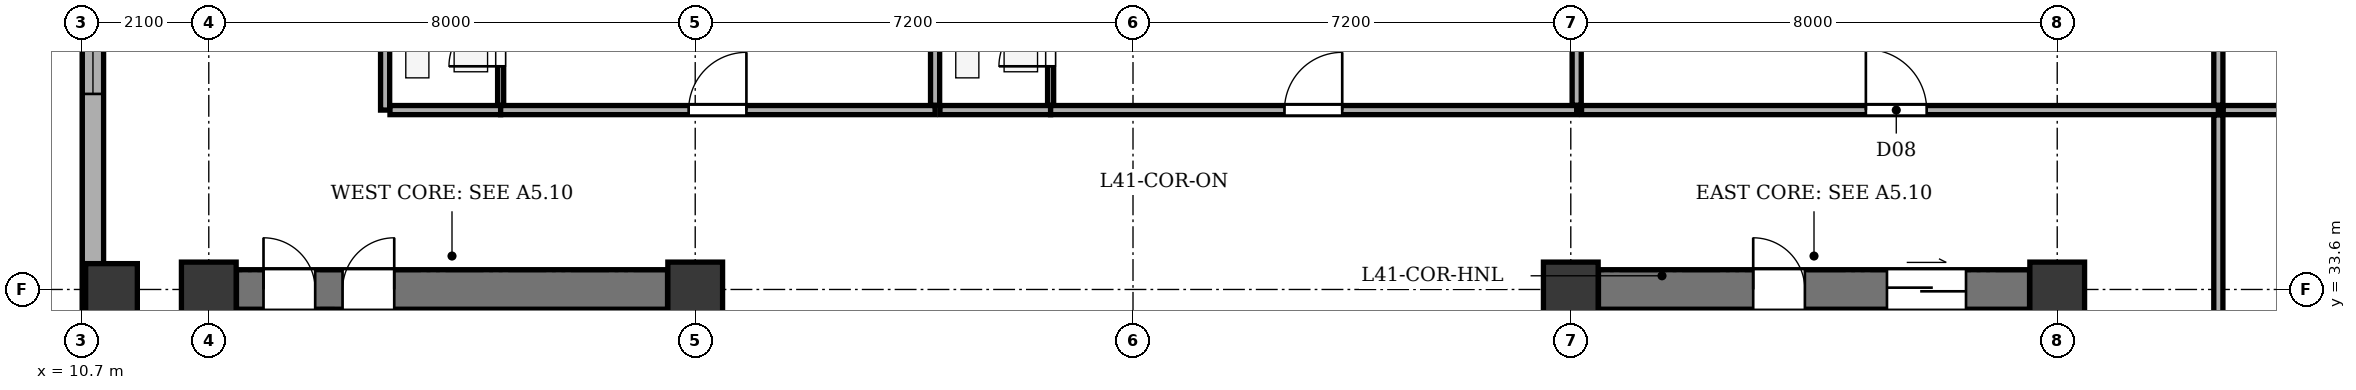
"""IFC4 building model, lengths in metres.
Left out: names, types, materials, properties, quantities, classifications, styles, units other than length and angle.
Written with IfcOpenShell. Run it as: python <this file> out.ifc"""

import sys

from ifc_helpers import new_model, si_unit, direction, frame, frame_2d, origin, origin_2d, place, context, subcontext, project, spatial, rectangle, extrude, element, fill, save


model = new_model("IFC4")
c1 = context("Model", 3, precision=1e-05, world=origin(), true_north=direction((0.0, 1.0)))
c2 = subcontext(c1, "Body", "Model", "MODEL_VIEW")
j1 = project(units=[si_unit("LENGTHUNIT", "METRE"), si_unit("PLANEANGLEUNIT", "RADIAN")], contexts=[c1])
p1 = place(None, origin())
s1 = spatial("IfcSite", under=j1, at=p1, CompositionType="ELEMENT")
p2 = place(p1, origin())
s2 = spatial("IfcBuilding", under=s1, at=p2, CompositionType="ELEMENT")
p3 = place(p2, frame((0.0, 0.0, 162.3)))
s3 = spatial("IfcBuildingStorey", under=s2, at=p3, CompositionType="ELEMENT", Elevation=162.3)
for number, where, z_axis, x_axis in (
    (1, (12.8, 33.6, 0.0), (0.0, 0.0, 1.0), (1.0, 0.0, 0.0)),
    (2, (20.8, 33.6, 0.0), (0.0, 0.0, 1.0), (1.0, 0.0, 0.0)),
    (3, (35.2, 33.6, 0.0), (0.0, 0.0, 1.0), (1.0, 0.0, 0.0)),
    (4, (43.2, 33.6, 0.0), (0.0, 0.0, 1.0), (1.0, 0.0, 0.0)),
):
    element("IfcColumn", number, at=place(p3, frame(where, z_axis=z_axis, x_axis=x_axis)), inside=s3, PredefinedType="COLUMN", context=c2, shape_type="SweptSolid", body=[
        extrude(rectangle(XDim=0.9, YDim=0.9, at=origin_2d()), origin(), (0.0, 0.0, 1.0), 3.5),
    ])
p4 = place(p3, frame((11.2, 33.6, 0.0), z_axis=(0.0, 0.0, 1.0), x_axis=(1.0, 0.0, 0.0)))
e5 = element("IfcColumn", 5, at=p4, inside=s3, PredefinedType="COLUMN", context=c2, shape_type="SweptSolid", body=[
    extrude(rectangle(XDim=0.85, YDim=0.85, at=origin_2d()), origin(), (0.0, 0.0, 1.0), 3.5),
])
p5 = place(p3, frame((10.895, 12.9, 0.0), z_axis=(0.0, 0.0, 1.0), x_axis=(0.0, 1.0, 0.0)))
e6 = element("IfcWall", 6, at=p5, inside=s3, PredefinedType="STANDARD", context=c2, shape_type="SweptSolid", body=[
    extrude(rectangle(XDim=35.0, YDim=0.35, at=frame_2d((17.5, 0.0))), origin(), (0.0, 0.0, 1.0), 2.785),
])
p6 = place(p5, frame((1.652, 0.0, 0.75)))
e7 = element("IfcOpeningElement", 7, at=p6, cuts=e6, PredefinedType="OPENING", context=c2, shape_type="SweptSolid", body=[
    extrude(rectangle(XDim=1.6, YDim=1.75, at=frame_2d((0.8, 0.875))), frame((0.0, 0.185, 0.0), z_axis=(0.0, -1.0, 0.0), x_axis=(1.0, 0.0, 0.0)), (0.0, 0.0, 1.0), 0.37),
])
p7 = place(p5, frame((4.748, 0.0, 0.75)))
e8 = element("IfcOpeningElement", 8, at=p7, cuts=e6, PredefinedType="OPENING", context=c2, shape_type="SweptSolid", body=[
    extrude(rectangle(XDim=1.6, YDim=1.75, at=frame_2d((0.8, 0.875))), frame((0.0, 0.185, 0.0), z_axis=(0.0, -1.0, 0.0), x_axis=(1.0, 0.0, 0.0)), (0.0, 0.0, 1.0), 0.37),
])
p8 = place(p5, frame((10.752, 0.0, 0.75)))
e9 = element("IfcOpeningElement", 9, at=p8, cuts=e6, PredefinedType="OPENING", context=c2, shape_type="SweptSolid", body=[
    extrude(rectangle(XDim=1.6, YDim=1.75, at=frame_2d((0.8, 0.875))), frame((0.0, 0.185, 0.0), z_axis=(0.0, -1.0, 0.0), x_axis=(1.0, 0.0, 0.0)), (0.0, 0.0, 1.0), 0.37),
])
p9 = place(p5, frame((15.998, 0.0, 0.75)))
e10 = element("IfcOpeningElement", 10, at=p9, cuts=e6, PredefinedType="OPENING", context=c2, shape_type="SweptSolid", body=[
    extrude(rectangle(XDim=2.1, YDim=1.75, at=frame_2d((1.05, 0.875))), frame((0.0, 0.185, 0.0), z_axis=(0.0, -1.0, 0.0), x_axis=(1.0, 0.0, 0.0)), (0.0, 0.0, 1.0), 0.37),
])
p10 = place(p5, frame((23.916, 0.0, 0.75)))
e11 = element("IfcOpeningElement", 11, at=p10, cuts=e6, PredefinedType="OPENING", context=c2, shape_type="SweptSolid", body=[
    extrude(rectangle(XDim=1.6, YDim=1.75, at=frame_2d((0.8, 0.875))), frame((0.0, 0.185, 0.0), z_axis=(0.0, -1.0, 0.0), x_axis=(1.0, 0.0, 0.0)), (0.0, 0.0, 1.0), 0.37),
])
p11 = place(p5, frame((29.834, 0.0, 0.75)))
e12 = element("IfcOpeningElement", 12, at=p11, cuts=e6, PredefinedType="OPENING", context=c2, shape_type="SweptSolid", body=[
    extrude(rectangle(XDim=2.1, YDim=1.75, at=frame_2d((1.05, 0.875))), frame((0.0, 0.185, 0.0), z_axis=(0.0, -1.0, 0.0), x_axis=(1.0, 0.0, 0.0)), (0.0, 0.0, 1.0), 0.37),
])
p12 = place(p3, frame((13.255, 33.6, 0.0), z_axis=(0.0, 0.0, 1.0), x_axis=(1.0, 0.0, 0.0)))
e13 = element("IfcWall", 13, at=p12, inside=s3, PredefinedType="SHEAR", context=c2, shape_type="SweptSolid", body=[
    extrude(rectangle(XDim=7.09, YDim=0.65, at=frame_2d((3.545, 0.0))), origin(), (0.0, 0.0, 1.0), 3.2),
])
p13 = place(p12, frame((0.445, 0.0, 0.0)))
e14 = element("IfcOpeningElement", 14, at=p13, cuts=e13, PredefinedType="OPENING", context=c2, shape_type="SweptSolid", body=[
    extrude(rectangle(XDim=0.85, YDim=2.02, at=frame_2d((0.425, 1.01))), frame((0.0, 0.335, 0.0), z_axis=(0.0, -1.0, 0.0), x_axis=(1.0, 0.0, 0.0)), (0.0, 0.0, 1.0), 0.67),
])
p14 = place(p12, frame((1.745, 0.0, 0.0)))
e15 = element("IfcOpeningElement", 15, at=p14, cuts=e13, PredefinedType="OPENING", context=c2, shape_type="SweptSolid", body=[
    extrude(rectangle(XDim=0.85, YDim=2.02, at=frame_2d((0.425, 1.01))), frame((0.0, 0.335, 0.0), z_axis=(0.0, -1.0, 0.0), x_axis=(1.0, 0.0, 0.0)), (0.0, 0.0, 1.0), 0.67),
])
p15 = place(p3, frame((16.435, 21.135, 0.0), z_axis=(0.0, 0.0, 1.0), x_axis=(0.0, 1.0, 0.0)))
e16 = element("IfcWall", 16, at=p15, inside=s3, PredefinedType="SHEAR", context=c2, shape_type="SweptSolid", body=[
    extrude(rectangle(XDim=12.13, YDim=0.25, at=frame_2d((6.065, 0.0))), origin(), (0.0, 0.0, 1.0), 3.2),
])
p16 = place(p15, frame((0.515, 0.0, 0.0)))
e17 = element("IfcOpeningElement", 17, at=p16, cuts=e16, PredefinedType="OPENING", context=c2, shape_type="SweptSolid", body=[
    extrude(rectangle(XDim=1.2, YDim=2.15, at=frame_2d((0.6, 1.075))), frame((0.0, 0.135, 0.0), z_axis=(0.0, -1.0, 0.0), x_axis=(1.0, 0.0, 0.0)), (0.0, 0.0, 1.0), 0.27),
])
p17 = place(p15, frame((2.665, 0.0, 0.0)))
e18 = element("IfcOpeningElement", 18, at=p17, cuts=e16, PredefinedType="OPENING", context=c2, shape_type="SweptSolid", body=[
    extrude(rectangle(XDim=1.15, YDim=2.15, at=frame_2d((0.575, 1.075))), frame((0.0, 0.135, 0.0), z_axis=(0.0, -1.0, 0.0), x_axis=(1.0, 0.0, 0.0)), (0.0, 0.0, 1.0), 0.27),
])
p18 = place(p3, frame((18.12, 31.17, 0.0), z_axis=(0.0, 0.0, 1.0), x_axis=(0.0, 1.0, 0.0)))
e19 = element("IfcWall", 19, at=p18, inside=s3, PredefinedType="PARTITIONING", context=c2, shape_type="SweptSolid", body=[
    extrude(rectangle(XDim=2.095, YDim=0.18, at=frame_2d((1.047, 0.0))), origin(), (0.0, 0.0, 1.0), 3.2),
])
p19 = place(p3, frame((35.655, 33.6, 0.0), z_axis=(0.0, 0.0, 1.0), x_axis=(1.0, 0.0, 0.0)))
e20 = element("IfcWall", 20, at=p19, inside=s3, PredefinedType="SHEAR", context=c2, shape_type="SweptSolid", body=[
    extrude(rectangle(XDim=7.09, YDim=0.65, at=frame_2d((3.545, 0.0))), origin(), (0.0, 0.0, 1.0), 3.2),
])
p20 = place(p19, frame((4.745, 0.0, 0.0)))
e21 = element("IfcOpeningElement", 21, at=p20, cuts=e20, PredefinedType="OPENING", context=c2, shape_type="SweptSolid", body=[
    extrude(rectangle(XDim=1.3, YDim=2.15, at=frame_2d((0.65, 1.075))), frame((0.0, 0.335, 0.0), z_axis=(0.0, -1.0, 0.0), x_axis=(1.0, 0.0, 0.0)), (0.0, 0.0, 1.0), 0.67),
])
p21 = place(p19, frame((2.545, 0.0, 0.0)))
e22 = element("IfcOpeningElement", 22, at=p21, cuts=e20, PredefinedType="OPENING", context=c2, shape_type="SweptSolid", body=[
    extrude(rectangle(XDim=0.85, YDim=2.02, at=frame_2d((0.425, 1.01))), frame((0.0, 0.335, 0.0), z_axis=(0.0, -1.0, 0.0), x_axis=(1.0, 0.0, 0.0)), (0.0, 0.0, 1.0), 0.67),
])
p22 = place(p3, frame((39.565, 21.135, 0.0), z_axis=(0.0, 0.0, 1.0), x_axis=(0.0, 1.0, 0.0)))
e23 = element("IfcWall", 23, at=p22, inside=s3, PredefinedType="SHEAR", context=c2, shape_type="SweptSolid", body=[
    extrude(rectangle(XDim=12.13, YDim=0.25, at=frame_2d((6.065, 0.0))), origin(), (0.0, 0.0, 1.0), 3.2),
])
p23 = place(p22, frame((0.515, 0.0, 0.0)))
e24 = element("IfcOpeningElement", 24, at=p23, cuts=e23, PredefinedType="OPENING", context=c2, shape_type="SweptSolid", body=[
    extrude(rectangle(XDim=1.2, YDim=2.15, at=frame_2d((0.6, 1.075))), frame((0.0, 0.135, 0.0), z_axis=(0.0, -1.0, 0.0), x_axis=(1.0, 0.0, 0.0)), (0.0, 0.0, 1.0), 0.27),
])
p24 = place(p22, frame((2.665, 0.0, 0.0)))
e25 = element("IfcOpeningElement", 25, at=p24, cuts=e23, PredefinedType="OPENING", context=c2, shape_type="SweptSolid", body=[
    extrude(rectangle(XDim=1.15, YDim=2.15, at=frame_2d((0.575, 1.075))), frame((0.0, 0.135, 0.0), z_axis=(0.0, -1.0, 0.0), x_axis=(1.0, 0.0, 0.0)), (0.0, 0.0, 1.0), 0.27),
])
p25 = place(p3, frame((37.9, 25.27, 0.0), z_axis=(0.0, 0.0, 1.0), x_axis=(0.0, 1.0, 0.0)))
e26 = element("IfcWall", 26, at=p25, inside=s3, PredefinedType="SOLIDWALL", context=c2, shape_type="SweptSolid", body=[
    extrude(rectangle(XDim=7.995, YDim=0.2, at=frame_2d((3.998, 0.0))), origin(), (0.0, 0.0, 1.0), 3.2),
])
p26 = place(p3, frame((14.75, 30.96, 0.0), z_axis=(0.0, 0.0, 1.0), x_axis=(0.0, 1.0, 0.0)))
e27 = element("IfcWall", 27, at=p26, inside=s3, PredefinedType="PARTITIONING", context=c2, shape_type="SweptSolid", body=[
    extrude(rectangle(XDim=2.31, YDim=0.15, at=frame_2d((1.155, 0.0))), origin(), (0.0, 0.0, 1.0), 3.2),
])
p27 = place(p26, frame((0.47, 0.0, 0.0)))
e28 = element("IfcOpeningElement", 28, at=p27, cuts=e27, PredefinedType="OPENING", context=c2, shape_type="SweptSolid", body=[
    extrude(rectangle(XDim=0.85, YDim=2.02, at=frame_2d((0.425, 1.01))), frame((0.0, 0.085, 0.0), z_axis=(0.0, -1.0, 0.0), x_axis=(1.0, 0.0, 0.0)), (0.0, 0.0, 1.0), 0.17),
])
p28 = place(p3, frame((15.7, 36.55, 0.0), z_axis=(0.0, 0.0, 1.0), x_axis=(0.0, 1.0, 0.0)))
e29 = element("IfcWall", 29, at=p28, inside=s3, PredefinedType="PARTITIONING", context=c2, shape_type="SweptSolid", body=[
    extrude(rectangle(XDim=15.975, YDim=0.15, at=frame_2d((7.987, 0.0))), origin(), (0.0, 0.0, 1.0), 3.2),
])
p29 = place(p3, frame((15.78, 36.55, 0.0), z_axis=(0.0, 0.0, 1.0), x_axis=(1.0, 0.0, 0.0)))
e30 = element("IfcWall", 30, at=p29, inside=s3, PredefinedType="PARTITIONING", context=c2, shape_type="SweptSolid", body=[
    extrude(rectangle(XDim=1.82, YDim=0.15, at=frame_2d((0.91, 0.0))), origin(), (0.0, 0.0, 1.0), 3.2),
])
p30 = place(p3, frame((17.6, 36.55, 0.0), z_axis=(0.0, 0.0, 1.0), x_axis=(1.0, 0.0, 0.0)))
e31 = element("IfcWall", 31, at=p30, inside=s3, PredefinedType="PARTITIONING", context=c2, shape_type="SweptSolid", body=[
    extrude(rectangle(XDim=7.145, YDim=0.15, at=frame_2d((3.573, 0.0))), origin(), (0.0, 0.0, 1.0), 3.2),
])
p31 = place(p30, frame((3.092, 0.0, 0.0)))
e32 = element("IfcOpeningElement", 32, at=p31, cuts=e31, PredefinedType="OPENING", context=c2, shape_type="SweptSolid", body=[
    extrude(rectangle(XDim=0.95, YDim=2.1, at=frame_2d((0.475, 1.05))), frame((0.0, 0.085, 0.0), z_axis=(0.0, -1.0, 0.0), x_axis=(1.0, 0.0, 0.0)), (0.0, 0.0, 1.0), 0.17),
])
p32 = place(p3, frame((17.6, 36.63, 0.0), z_axis=(0.0, 0.0, 1.0), x_axis=(0.0, 1.0, 0.0)))
e33 = element("IfcWall", 33, at=p32, inside=s3, PredefinedType="PARTITIONING", context=c2, shape_type="SweptSolid", body=[
    extrude(rectangle(XDim=2.25, YDim=0.1, at=frame_2d((1.125, 0.0))), origin(), (0.0, 0.0, 1.0), 3.2),
])
p33 = place(p32, frame((0.64, 0.0, 0.0)))
e34 = element("IfcOpeningElement", 34, at=p33, cuts=e33, PredefinedType="OPENING", context=c2, shape_type="SweptSolid", body=[
    extrude(rectangle(XDim=0.85, YDim=2.05, at=frame_2d((0.425, 1.025))), frame((0.0, 0.06, 0.0), z_axis=(0.0, -1.0, 0.0), x_axis=(1.0, 0.0, 0.0)), (0.0, 0.0, 1.0), 0.12),
])
p34 = place(p3, frame((24.745, 36.63, 0.0), z_axis=(0.0, 0.0, 1.0), x_axis=(0.0, 1.0, 0.0)))
e35 = element("IfcWall", 35, at=p34, inside=s3, PredefinedType="PARTITIONING", context=c2, shape_type="SweptSolid", body=[
    extrude(rectangle(XDim=15.895, YDim=0.15, at=frame_2d((7.948, 0.0))), origin(), (0.0, 0.0, 1.0), 3.2),
])
p35 = place(p3, frame((24.825, 36.55, 0.0), z_axis=(0.0, 0.0, 1.0), x_axis=(1.0, 0.0, 0.0)))
e36 = element("IfcWall", 36, at=p35, inside=s3, PredefinedType="PARTITIONING", context=c2, shape_type="SweptSolid", body=[
    extrude(rectangle(XDim=1.82, YDim=0.15, at=frame_2d((0.91, 0.0))), origin(), (0.0, 0.0, 1.0), 3.2),
])
p36 = place(p3, frame((26.645, 36.55, 0.0), z_axis=(0.0, 0.0, 1.0), x_axis=(1.0, 0.0, 0.0)))
e37 = element("IfcWall", 37, at=p36, inside=s3, PredefinedType="PARTITIONING", context=c2, shape_type="SweptSolid", body=[
    extrude(rectangle(XDim=8.652, YDim=0.15, at=frame_2d((4.326, 0.0))), origin(), (0.0, 0.0, 1.0), 3.2),
])
p37 = place(p36, frame((3.846, 0.0, 0.0)))
e38 = element("IfcOpeningElement", 38, at=p37, cuts=e37, PredefinedType="OPENING", context=c2, shape_type="SweptSolid", body=[
    extrude(rectangle(XDim=0.95, YDim=2.1, at=frame_2d((0.475, 1.05))), frame((0.0, 0.085, 0.0), z_axis=(0.0, -1.0, 0.0), x_axis=(1.0, 0.0, 0.0)), (0.0, 0.0, 1.0), 0.17),
])
p38 = place(p3, frame((26.645, 36.63, 0.0), z_axis=(0.0, 0.0, 1.0), x_axis=(0.0, 1.0, 0.0)))
e39 = element("IfcWall", 39, at=p38, inside=s3, PredefinedType="PARTITIONING", context=c2, shape_type="SweptSolid", body=[
    extrude(rectangle(XDim=2.25, YDim=0.1, at=frame_2d((1.125, 0.0))), origin(), (0.0, 0.0, 1.0), 3.2),
])
p39 = place(p38, frame((0.64, 0.0, 0.0)))
e40 = element("IfcOpeningElement", 40, at=p39, cuts=e39, PredefinedType="OPENING", context=c2, shape_type="SweptSolid", body=[
    extrude(rectangle(XDim=0.85, YDim=2.05, at=frame_2d((0.425, 1.025))), frame((0.0, 0.06, 0.0), z_axis=(0.0, -1.0, 0.0), x_axis=(1.0, 0.0, 0.0)), (0.0, 0.0, 1.0), 0.12),
])
p40 = place(p3, frame((35.297, 36.63, 0.0), z_axis=(0.0, 0.0, 1.0), x_axis=(0.0, 1.0, 0.0)))
e41 = element("IfcWall", 41, at=p40, inside=s3, PredefinedType="PARTITIONING", context=c2, shape_type="SweptSolid", body=[
    extrude(rectangle(XDim=15.895, YDim=0.15, at=frame_2d((7.948, 0.0))), origin(), (0.0, 0.0, 1.0), 2.535),
])
p41 = place(p3, frame((35.377, 36.55, 0.0), z_axis=(0.0, 0.0, 1.0), x_axis=(1.0, 0.0, 0.0)))
e42 = element("IfcWall", 42, at=p41, inside=s3, PredefinedType="PARTITIONING", context=c2, shape_type="SweptSolid", body=[
    extrude(rectangle(XDim=10.473, YDim=0.15, at=frame_2d((5.237, 0.0))), origin(), (0.0, 0.0, 1.0), 3.2),
])
p42 = place(p41, frame((4.676, 0.0, 0.0)))
e43 = element("IfcOpeningElement", 43, at=p42, cuts=e42, PredefinedType="OPENING", context=c2, shape_type="SweptSolid", body=[
    extrude(rectangle(XDim=1.0, YDim=2.1, at=frame_2d((0.5, 1.05))), frame((0.0, 0.085, 0.0), z_axis=(0.0, -1.0, 0.0), x_axis=(1.0, 0.0, 0.0)), (0.0, 0.0, 1.0), 0.17),
])
p43 = place(p3, frame((45.85, 36.63, 0.0), z_axis=(0.0, 0.0, 1.0), x_axis=(0.0, 1.0, 0.0)))
e44 = element("IfcWall", 44, at=p43, inside=s3, PredefinedType="PARTITIONING", context=c2, shape_type="SweptSolid", body=[
    extrude(rectangle(XDim=15.895, YDim=0.15, at=frame_2d((7.948, 0.0))), origin(), (0.0, 0.0, 1.0), 3.2),
])
p44 = place(p3, frame((45.93, 36.55, 0.0), z_axis=(0.0, 0.0, 1.0), x_axis=(1.0, 0.0, 0.0)))
e45 = element("IfcWall", 45, at=p44, inside=s3, PredefinedType="PARTITIONING", context=c2, shape_type="SweptSolid", body=[
    extrude(rectangle(XDim=9.395, YDim=0.15, at=frame_2d((4.698, 0.0))), origin(), (0.0, 0.0, 1.0), 3.2),
])
p45 = place(p3, frame((45.85, 17.93, 0.0), z_axis=(0.0, 0.0, 1.0), x_axis=(0.0, 1.0, 0.0)))
e46 = element("IfcWall", 46, at=p45, inside=s3, PredefinedType="PARTITIONING", context=c2, shape_type="SweptSolid", body=[
    extrude(rectangle(XDim=18.54, YDim=0.15, at=frame_2d((9.27, 0.0))), origin(), (0.0, 0.0, 1.0), 3.2),
])
p46 = place(p45, frame((8.79, 0.0, 0.0)))
e47 = element("IfcOpeningElement", 47, at=p46, cuts=e46, PredefinedType="OPENING", context=c2, shape_type="SweptSolid", body=[
    extrude(rectangle(XDim=0.95, YDim=2.1, at=frame_2d((0.475, 1.05))), frame((0.0, 0.085, 0.0), z_axis=(0.0, -1.0, 0.0), x_axis=(1.0, 0.0, 0.0)), (0.0, 0.0, 1.0), 0.17),
])
p47 = place(p10, origin())
e48 = element("IfcWindow", 48, at=p47, inside=s3, PartitioningType="SINGLE_PANEL", PredefinedType="WINDOW", context=c2, shape_type="SweptSolid", body=[
    extrude(rectangle(XDim=1.6, YDim=1.75, at=frame_2d((0.8, 0.875))), frame((0.0, -0.01, 0.0), z_axis=(0.0, -1.0, 0.0), x_axis=(1.0, 0.0, 0.0)), (0.0, 0.0, 1.0), 0.06),
])
fill(e11, e48)
p48 = place(p13, origin())
e49 = element("IfcDoor", 49, at=p48, inside=s3, OperationType="SINGLE_SWING_LEFT", PredefinedType="DOOR", context=c2, shape_type="SweptSolid", body=[
    extrude(rectangle(XDim=0.85, YDim=2.02, at=frame_2d((0.425, 1.01))), frame((0.0, 0.025, 0.0), z_axis=(0.0, -1.0, 0.0), x_axis=(1.0, 0.0, 0.0)), (0.0, 0.0, 1.0), 0.05),
])
fill(e14, e49)
p49 = place(p14, origin())
e50 = element("IfcDoor", 50, at=p49, inside=s3, OperationType="SINGLE_SWING_RIGHT", PredefinedType="DOOR", context=c2, shape_type="SweptSolid", body=[
    extrude(rectangle(XDim=0.85, YDim=2.02, at=frame_2d((0.425, 1.01))), frame((0.0, 0.025, 0.0), z_axis=(0.0, -1.0, 0.0), x_axis=(1.0, 0.0, 0.0)), (0.0, 0.0, 1.0), 0.05),
])
fill(e15, e50)
p50 = place(p20, origin())
e51 = element("IfcDoor", 51, at=p50, inside=s3, OperationType="DOUBLE_DOOR_SLIDING", PredefinedType="DOOR", context=c2, shape_type="SweptSolid", body=[
    extrude(rectangle(XDim=1.3, YDim=2.15, at=frame_2d((0.65, 1.075))), frame((0.0, 0.025, 0.0), z_axis=(0.0, -1.0, 0.0), x_axis=(1.0, 0.0, 0.0)), (0.0, 0.0, 1.0), 0.05),
])
fill(e21, e51)
p51 = place(p21, origin())
e52 = element("IfcDoor", 52, at=p51, inside=s3, OperationType="SINGLE_SWING_LEFT", PredefinedType="DOOR", context=c2, shape_type="SweptSolid", body=[
    extrude(rectangle(XDim=0.85, YDim=2.02, at=frame_2d((0.425, 1.01))), frame((0.0, 0.025, 0.0), z_axis=(0.0, -1.0, 0.0), x_axis=(1.0, 0.0, 0.0)), (0.0, 0.0, 1.0), 0.05),
])
fill(e22, e52)
p52 = place(p33, origin())
e53 = element("IfcDoor", 53, at=p52, inside=s3, OperationType="SINGLE_SWING_LEFT", PredefinedType="DOOR", context=c2, shape_type="SweptSolid", body=[
    extrude(rectangle(XDim=0.85, YDim=2.05, at=frame_2d((0.425, 1.025))), frame((0.0, 0.025, 0.0), z_axis=(0.0, -1.0, 0.0), x_axis=(1.0, 0.0, 0.0)), (0.0, 0.0, 1.0), 0.05),
])
fill(e34, e53)
p53 = place(p31, origin())
e54 = element("IfcDoor", 54, at=p53, inside=s3, OperationType="SINGLE_SWING_RIGHT", PredefinedType="DOOR", context=c2, shape_type="SweptSolid", body=[
    extrude(rectangle(XDim=0.95, YDim=2.1, at=frame_2d((0.475, 1.05))), frame((0.0, 0.025, 0.0), z_axis=(0.0, -1.0, 0.0), x_axis=(1.0, 0.0, 0.0)), (0.0, 0.0, 1.0), 0.05),
])
fill(e32, e54)
p54 = place(p39, origin())
e55 = element("IfcDoor", 55, at=p54, inside=s3, OperationType="SINGLE_SWING_LEFT", PredefinedType="DOOR", context=c2, shape_type="SweptSolid", body=[
    extrude(rectangle(XDim=0.85, YDim=2.05, at=frame_2d((0.425, 1.025))), frame((0.0, 0.025, 0.0), z_axis=(0.0, -1.0, 0.0), x_axis=(1.0, 0.0, 0.0)), (0.0, 0.0, 1.0), 0.05),
])
fill(e40, e55)
p55 = place(p37, origin())
e56 = element("IfcDoor", 56, at=p55, inside=s3, OperationType="SINGLE_SWING_RIGHT", PredefinedType="DOOR", context=c2, shape_type="SweptSolid", body=[
    extrude(rectangle(XDim=0.95, YDim=2.1, at=frame_2d((0.475, 1.05))), frame((0.0, 0.025, 0.0), z_axis=(0.0, -1.0, 0.0), x_axis=(1.0, 0.0, 0.0)), (0.0, 0.0, 1.0), 0.05),
])
fill(e38, e56)
p56 = place(p42, origin())
e57 = element("IfcDoor", 57, at=p56, inside=s3, OperationType="SINGLE_SWING_LEFT", PredefinedType="DOOR", context=c2, shape_type="SweptSolid", body=[
    extrude(rectangle(XDim=1.0, YDim=2.1, at=frame_2d((0.5, 1.05))), frame((0.0, 0.025, 0.0), z_axis=(0.0, -1.0, 0.0), x_axis=(1.0, 0.0, 0.0)), (0.0, 0.0, 1.0), 0.05),
])
fill(e43, e57)
save(model, sys.argv[1])
